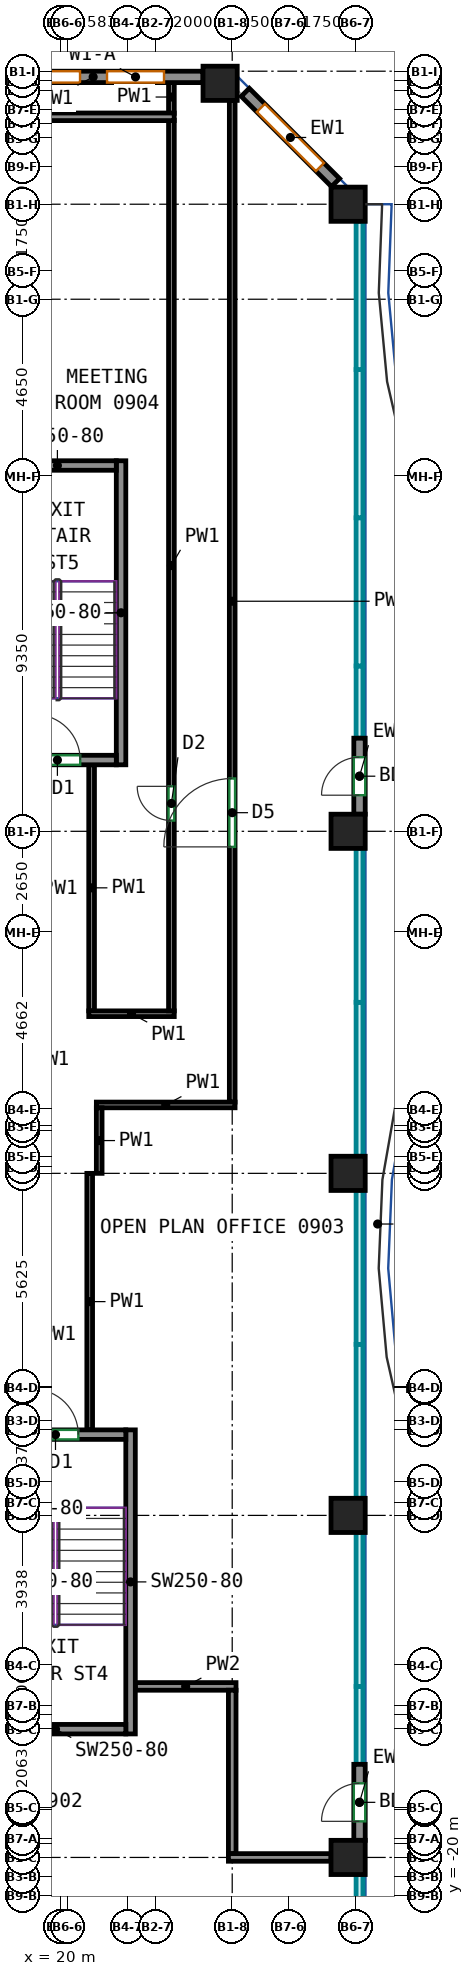
"""IFC4 building model, lengths in metres.
Left out: names, types, materials, properties, quantities, classifications, styles, units other than length and angle.
Written with IfcOpenShell. Run it as: python <this file> out.ifc"""

import sys

from ifc_helpers import new_model, si_unit, direction, frame, frame_2d, origin, origin_2d, place, context, subcontext, project, spatial, rectangle, extrude, source, transform, mapped, element, fill, save


model = new_model("IFC4")
c1 = context("Model", 3, precision=1e-05, world=origin(), true_north=direction((0.0, 1.0)))
c2 = subcontext(c1, "Body", "Model", "MODEL_VIEW")
j1 = project(units=[si_unit("LENGTHUNIT", "METRE"), si_unit("PLANEANGLEUNIT", "RADIAN")], contexts=[c1])
p1 = place(None, origin())
s1 = spatial("IfcSite", under=j1, at=p1, CompositionType="ELEMENT")
p2 = place(p1, origin())
s2 = spatial("IfcBuilding", under=s1, at=p2, CompositionType="ELEMENT")
p3 = place(p2, frame((0.0, 0.0, 43.0)))
s3 = spatial("IfcBuildingStorey", under=s2, at=p3, CompositionType="ELEMENT", Elevation=43.0)
m1 = source(origin(), c2, "Body", "SweptSolid", [
    extrude(rectangle(XDim=0.9, YDim=0.9, at=origin_2d()), origin(), (0.0, 0.0, 1.0), 3.72),
])
for number, where, z_axis, x_axis in (
    (1, (24.182, 27.682, 0.0), (0.0, 0.0, 1.0), (1.0, 0.0, 0.0)),
    (2, (27.55, -19.0, 0.0), (0.0, 0.0, 1.0), (1.0, 0.0, 0.0)),
    (3, (27.55, -10.0, 0.0), (0.0, 0.0, 1.0), (1.0, 0.0, 0.0)),
    (4, (27.55, -1.0, 0.0), (0.0, 0.0, 1.0), (1.0, 0.0, 0.0)),
    (5, (27.55, 8.0, 0.0), (0.0, 0.0, 1.0), (1.0, 0.0, 0.0)),
    (6, (27.55, 24.5, 0.0), (0.0, 0.0, 1.0), (1.0, 0.0, 0.0)),
):
    element("IfcColumn", number, at=place(p3, frame(where, z_axis=z_axis, x_axis=x_axis)), inside=s3, PredefinedType="COLUMN", context=c2, shape_type="MappedRepresentation", body=[
        mapped(m1, transform((0.0, 0.0, 0.0))),
    ])
m2 = source(origin(), c2, "Body", "SweptSolid", [
    extrude(rectangle(XDim=8.0, YDim=0.25, at=frame_2d((4.0, 0.0))), origin(), (0.0, 0.0, 1.0), 3.72),
])
p4 = place(p3, frame((21.825, -15.75, 0.0), z_axis=(0.0, 0.0, 1.0), x_axis=(0.0, 1.0, 0.0)))
e7 = element("IfcWall", 7, at=p4, inside=s3, PredefinedType="SHEAR", context=c2, shape_type="MappedRepresentation", body=[
    mapped(m2, transform((0.0, 0.0, 0.0))),
])
m3 = source(origin(), c2, "Body", "SweptSolid", [
    extrude(rectangle(XDim=3.7, YDim=0.25, at=frame_2d((1.85, 0.0))), origin(), (0.0, 0.0, 1.0), 3.72),
])
p5 = place(p3, frame((18.0, -15.625, 0.0), z_axis=(0.0, 0.0, 1.0), x_axis=(1.0, 0.0, 0.0)))
e8 = element("IfcWall", 8, at=p5, inside=s3, PredefinedType="SHEAR", context=c2, shape_type="MappedRepresentation", body=[
    mapped(m3, transform((0.0, 0.0, 0.0))),
])
p6 = place(p3, frame((18.0, -7.875, 0.0), z_axis=(0.0, 0.0, 1.0), x_axis=(1.0, 0.0, 0.0)))
e9 = element("IfcWall", 9, at=p6, inside=s3, PredefinedType="SHEAR", context=c2, shape_type="MappedRepresentation", body=[
    mapped(m3, transform((0.0, 0.0, 0.0))),
])
p7 = place(p6, frame((1.25, 0.0, 0.0)))
e10 = element("IfcOpeningElement", 10, at=p7, cuts=e9, PredefinedType="OPENING", context=c2, shape_type="SweptSolid", body=[
    extrude(rectangle(XDim=1.2, YDim=2.1, at=frame_2d((0.6, 1.05))), frame((0.0, 0.135, 0.0), z_axis=(0.0, -1.0, 0.0), x_axis=(1.0, 0.0, 0.0)), (0.0, 0.0, 1.0), 0.27),
])
p8 = place(p3, frame((21.575, 9.75, 0.0), z_axis=(0.0, 0.0, 1.0), x_axis=(0.0, 1.0, 0.0)))
e11 = element("IfcWall", 11, at=p8, inside=s3, PredefinedType="SHEAR", context=c2, shape_type="MappedRepresentation", body=[
    mapped(m2, transform((0.0, 0.0, 0.0))),
])
m4 = source(origin(), c2, "Body", "SweptSolid", [
    extrude(rectangle(XDim=3.1, YDim=0.25, at=frame_2d((1.55, 0.0))), origin(), (0.0, 0.0, 1.0), 3.72),
])
p9 = place(p3, frame((18.35, 9.875, 0.0), z_axis=(0.0, 0.0, 1.0), x_axis=(1.0, 0.0, 0.0)))
e12 = element("IfcWall", 12, at=p9, inside=s3, PredefinedType="SHEAR", context=c2, shape_type="MappedRepresentation", body=[
    mapped(m4, transform((0.0, 0.0, 0.0))),
])
p10 = place(p9, frame((0.95, 0.0, 0.0)))
e13 = element("IfcOpeningElement", 13, at=p10, cuts=e12, PredefinedType="OPENING", context=c2, shape_type="SweptSolid", body=[
    extrude(rectangle(XDim=1.2, YDim=2.1, at=frame_2d((0.6, 1.05))), frame((0.0, 0.135, 0.0), z_axis=(0.0, -1.0, 0.0), x_axis=(1.0, 0.0, 0.0)), (0.0, 0.0, 1.0), 0.27),
])
p11 = place(p3, frame((18.35, 17.625, 0.0), z_axis=(0.0, 0.0, 1.0), x_axis=(1.0, 0.0, 0.0)))
e14 = element("IfcWall", 14, at=p11, inside=s3, PredefinedType="SHEAR", context=c2, shape_type="MappedRepresentation", body=[
    mapped(m4, transform((0.0, 0.0, 0.0))),
])
m5 = source(origin(), c2, "Body", "SweptSolid", [
    extrude(rectangle(XDim=2.0, YDim=0.3, at=frame_2d((1.0, 0.0))), origin(), (0.0, 0.0, 1.0), 3.72),
])
p12 = place(p3, frame((27.85, -18.55, 0.0), z_axis=(0.0, 0.0, 1.0), x_axis=(0.0, 1.0, 0.0)))
e15 = element("IfcWall", 15, at=p12, inside=s3, PredefinedType="SOLIDWALL", context=c2, shape_type="MappedRepresentation", body=[
    mapped(m5, transform((0.0, 0.0, 0.0))),
])
p13 = place(p12, frame((0.5, 0.0, 0.0)))
e16 = element("IfcOpeningElement", 16, at=p13, cuts=e15, PredefinedType="OPENING", context=c2, shape_type="SweptSolid", body=[
    extrude(rectangle(XDim=1.0, YDim=2.1, at=frame_2d((0.5, 1.05))), frame((0.0, 0.16, 0.0), z_axis=(0.0, -1.0, 0.0), x_axis=(1.0, 0.0, 0.0)), (0.0, 0.0, 1.0), 0.32),
])
p14 = place(p3, frame((27.85, 8.45, 0.0), z_axis=(0.0, 0.0, 1.0), x_axis=(0.0, 1.0, 0.0)))
e17 = element("IfcWall", 17, at=p14, inside=s3, PredefinedType="SOLIDWALL", context=c2, shape_type="MappedRepresentation", body=[
    mapped(m5, transform((0.0, 0.0, 0.0))),
])
p15 = place(p14, frame((0.5, 0.0, 0.0)))
e18 = element("IfcOpeningElement", 18, at=p15, cuts=e17, PredefinedType="OPENING", context=c2, shape_type="SweptSolid", body=[
    extrude(rectangle(XDim=1.0, YDim=2.1, at=frame_2d((0.5, 1.05))), frame((0.0, 0.16, 0.0), z_axis=(0.0, -1.0, 0.0), x_axis=(1.0, 0.0, 0.0)), (0.0, 0.0, 1.0), 0.32),
])
m6 = source(origin(), c2, "Body", "SweptSolid", [
    extrude(rectangle(XDim=3.359, YDim=0.3, at=frame_2d((1.679, 0.0))), origin(), (0.0, 0.0, 1.0), 3.72),
])
p16 = place(p3, frame((27.219, 25.069, 0.0), z_axis=(0.0, 0.0, 1.0), x_axis=(-0.707070438228, 0.707143122278, 0.0)))
e19 = element("IfcWall", 19, at=p16, inside=s3, PredefinedType="SOLIDWALL", context=c2, shape_type="MappedRepresentation", body=[
    mapped(m6, transform((0.0, 0.0, 0.0))),
])
p17 = place(p16, frame((0.579, 0.0, 0.7)))
e20 = element("IfcOpeningElement", 20, at=p17, cuts=e19, PredefinedType="OPENING", context=c2, shape_type="SweptSolid", body=[
    extrude(rectangle(XDim=2.2, YDim=2.25, at=frame_2d((1.1, 1.125))), frame((0.0, 0.16, 0.0), z_axis=(0.0, -1.0, 0.0), x_axis=(1.0, 0.0, 0.0)), (0.0, 0.0, 1.0), 0.32),
])
m7 = source(origin(), c2, "Body", "SweptSolid", [
    extrude(rectangle(XDim=5.782, YDim=0.3, at=frame_2d((2.891, 0.0))), origin(), (0.0, 0.0, 1.0), 3.72),
])
p18 = place(p3, frame((23.732, 27.85, 0.0), z_axis=(0.0, 0.0, 1.0), x_axis=(-1.0, 0.0, 0.0)))
e21 = element("IfcWall", 21, at=p18, inside=s3, PredefinedType="SOLIDWALL", context=c2, shape_type="MappedRepresentation", body=[
    mapped(m7, transform((0.0, 0.0, 0.0))),
])
p19 = place(p18, frame((1.026, 0.0, 0.7)))
e22 = element("IfcOpeningElement", 22, at=p19, cuts=e21, PredefinedType="OPENING", context=c2, shape_type="SweptSolid", body=[
    extrude(rectangle(XDim=1.5, YDim=2.25, at=frame_2d((0.75, 1.125))), frame((0.0, 0.16, 0.0), z_axis=(0.0, -1.0, 0.0), x_axis=(1.0, 0.0, 0.0)), (0.0, 0.0, 1.0), 0.32),
])
p20 = place(p18, frame((3.236, 0.0, 0.7)))
e23 = element("IfcOpeningElement", 23, at=p20, cuts=e21, PredefinedType="OPENING", context=c2, shape_type="SweptSolid", body=[
    extrude(rectangle(XDim=2.2, YDim=2.25, at=frame_2d((1.1, 1.125))), frame((0.0, 0.16, 0.0), z_axis=(0.0, -1.0, 0.0), x_axis=(1.0, 0.0, 0.0)), (0.0, 0.0, 1.0), 0.32),
])
p21 = place(p3, frame((20.8, 3.275, 0.0), z_axis=(0.0, 0.0, 1.0), x_axis=(0.0, 1.0, 0.0)))
e24 = element("IfcWall", 24, at=p21, inside=s3, PredefinedType="PARTITIONING", context=c2, shape_type="SweptSolid", body=[
    extrude(rectangle(XDim=6.475, YDim=0.15, at=frame_2d((3.238, 0.0))), origin(), (0.0, 0.0, 1.0), 3.72),
])
p22 = place(p3, frame((20.725, 3.2, 0.0), z_axis=(0.0, 0.0, 1.0), x_axis=(1.0, 0.0, 0.0)))
e25 = element("IfcWall", 25, at=p22, inside=s3, PredefinedType="PARTITIONING", context=c2, shape_type="SweptSolid", body=[
    extrude(rectangle(XDim=2.25, YDim=0.15, at=frame_2d((1.125, 0.0))), origin(), (0.0, 0.0, 1.0), 3.72),
])
p23 = place(p3, frame((22.9, 3.275, 0.0), z_axis=(0.0, 0.0, 1.0), x_axis=(0.0, 1.0, 0.0)))
e26 = element("IfcWall", 26, at=p23, inside=s3, PredefinedType="PARTITIONING", context=c2, shape_type="SweptSolid", body=[
    extrude(rectangle(XDim=23.435, YDim=0.15, at=frame_2d((11.718, 0.0))), origin(), (0.0, 0.0, 1.0), 3.72),
])
p24 = place(p23, frame((5.008, 0.0, 0.0)))
e27 = element("IfcOpeningElement", 27, at=p24, cuts=e26, PredefinedType="OPENING", context=c2, shape_type="SweptSolid", body=[
    extrude(rectangle(XDim=0.9, YDim=2.1, at=frame_2d((0.45, 1.05))), frame((0.0, 0.085, 0.0), z_axis=(0.0, -1.0, 0.0), x_axis=(1.0, 0.0, 0.0)), (0.0, 0.0, 1.0), 0.17),
])
p25 = place(p3, frame((24.5, 0.875, 0.0), z_axis=(0.0, 0.0, 1.0), x_axis=(0.0, 1.0, 0.0)))
e28 = element("IfcWall", 28, at=p25, inside=s3, PredefinedType="PARTITIONING", context=c2, shape_type="SweptSolid", body=[
    extrude(rectangle(XDim=26.357, YDim=0.15, at=frame_2d((13.178, 0.0))), origin(), (0.0, 0.0, 1.0), 3.07),
])
p26 = place(p25, frame((6.715, 0.0, 0.0)))
e29 = element("IfcOpeningElement", 29, at=p26, cuts=e28, PredefinedType="OPENING", context=c2, shape_type="SweptSolid", body=[
    extrude(rectangle(XDim=1.8, YDim=2.1, at=frame_2d((0.9, 1.05))), frame((0.0, 0.085, 0.0), z_axis=(0.0, -1.0, 0.0), x_axis=(1.0, 0.0, 0.0)), (0.0, 0.0, 1.0), 0.17),
])
p27 = place(p3, frame((20.925, 0.8, 0.0), z_axis=(0.0, 0.0, 1.0), x_axis=(1.0, 0.0, 0.0)))
e30 = element("IfcWall", 30, at=p27, inside=s3, PredefinedType="PARTITIONING", context=c2, shape_type="SweptSolid", body=[
    extrude(rectangle(XDim=3.65, YDim=0.15, at=frame_2d((1.825, 0.0))), origin(), (0.0, 0.0, 1.0), 3.72),
])
p28 = place(p3, frame((21.0, -1.0, 0.0), z_axis=(0.0, 0.0, 1.0), x_axis=(0.0, 1.0, 0.0)))
e31 = element("IfcWall", 31, at=p28, inside=s3, PredefinedType="PARTITIONING", context=c2, shape_type="SweptSolid", body=[
    extrude(rectangle(XDim=1.725, YDim=0.15, at=frame_2d((0.863, 0.0))), origin(), (0.0, 0.0, 1.0), 3.72),
])
p29 = place(p3, frame((20.75, -7.75, 0.0), z_axis=(0.0, 0.0, 1.0), x_axis=(0.0, 1.0, 0.0)))
e32 = element("IfcWall", 32, at=p29, inside=s3, PredefinedType="PARTITIONING", context=c2, shape_type="SweptSolid", body=[
    extrude(rectangle(XDim=6.75, YDim=0.15, at=frame_2d((3.375, 0.0))), origin(), (0.0, 0.0, 1.0), 3.72),
])
p30 = place(p3, frame((22.9, 26.891, 0.0), z_axis=(0.0, 0.0, 1.0), x_axis=(0.0, 1.0, 0.0)))
e33 = element("IfcWall", 33, at=p30, inside=s3, PredefinedType="PARTITIONING", context=c2, shape_type="SweptSolid", body=[
    extrude(rectangle(XDim=0.859, YDim=0.15, at=frame_2d((0.429, 0.0))), origin(), (0.0, 0.0, 1.0), 3.72),
])
p31 = place(p3, frame((-20.874, 26.8, 0.0), z_axis=(0.0, 0.0, 1.0), x_axis=(1.0, 0.0, 0.0)))
e34 = element("IfcWall", 34, at=p31, inside=s3, PredefinedType="PARTITIONING", context=c2, shape_type="SweptSolid", body=[
    extrude(rectangle(XDim=43.848, YDim=0.2, at=frame_2d((21.924, 0.0))), origin(), (0.0, 0.0, 1.0), 3.72),
])
p32 = place(p31, frame((31.863, 0.0, 0.0)))
e35 = element("IfcOpeningElement", 35, at=p32, cuts=e34, PredefinedType="OPENING", context=c2, shape_type="SweptSolid", body=[
    extrude(rectangle(XDim=1.0, YDim=2.1, at=frame_2d((0.5, 1.05))), frame((0.0, 0.11, 0.0), z_axis=(0.0, -1.0, 0.0), x_axis=(1.0, 0.0, 0.0)), (0.0, 0.0, 1.0), 0.22),
])
p33 = place(p3, frame((24.6, -14.5, 0.0), z_axis=(0.0, 0.0, 1.0), x_axis=(-1.0, 0.0, 0.0)))
e36 = element("IfcWall", 36, at=p33, inside=s3, PredefinedType="PARTITIONING", context=c2, shape_type="SweptSolid", body=[
    extrude(rectangle(XDim=2.65, YDim=0.2, at=frame_2d((1.325, 0.0))), origin(), (0.0, 0.0, 1.0), 3.72),
])
p34 = place(p3, frame((24.5, -18.9, 0.0), z_axis=(0.0, 0.0, 1.0), x_axis=(0.0, 1.0, 0.0)))
e37 = element("IfcWall", 37, at=p34, inside=s3, PredefinedType="PARTITIONING", context=c2, shape_type="SweptSolid", body=[
    extrude(rectangle(XDim=4.3, YDim=0.2, at=frame_2d((2.15, 0.0))), origin(), (0.0, 0.0, 1.0), 3.07),
])
p35 = place(p3, frame((27.1, -19.0, 0.0), z_axis=(0.0, 0.0, 1.0), x_axis=(-1.0, 0.0, 0.0)))
e38 = element("IfcWall", 38, at=p35, inside=s3, PredefinedType="PARTITIONING", context=c2, shape_type="SweptSolid", body=[
    extrude(rectangle(XDim=2.7, YDim=0.2, at=frame_2d((1.35, 0.0))), origin(), (0.0, 0.0, 1.0), 3.07),
])
p36 = place(p13, origin())
e39 = element("IfcDoor", 39, at=p36, inside=s3, OperationType="SINGLE_SWING_LEFT", PredefinedType="DOOR", context=c2, shape_type="SweptSolid", body=[
    extrude(rectangle(XDim=1.0, YDim=2.1, at=frame_2d((0.5, 1.05))), frame((0.0, 0.025, 0.0), z_axis=(0.0, -1.0, 0.0), x_axis=(1.0, 0.0, 0.0)), (0.0, 0.0, 1.0), 0.05),
])
fill(e16, e39)
p37 = place(p15, origin())
e40 = element("IfcDoor", 40, at=p37, inside=s3, OperationType="SINGLE_SWING_LEFT", PredefinedType="DOOR", context=c2, shape_type="SweptSolid", body=[
    extrude(rectangle(XDim=1.0, YDim=2.1, at=frame_2d((0.5, 1.05))), frame((0.0, 0.025, 0.0), z_axis=(0.0, -1.0, 0.0), x_axis=(1.0, 0.0, 0.0)), (0.0, 0.0, 1.0), 0.05),
])
fill(e18, e40)
p38 = place(p17, origin())
e41 = element("IfcWindow", 41, at=p38, inside=s3, PartitioningType="SINGLE_PANEL", PredefinedType="WINDOW", context=c2, shape_type="SweptSolid", body=[
    extrude(rectangle(XDim=2.2, YDim=2.25, at=frame_2d((1.1, 1.125))), frame((0.0, 0.03, 0.0), z_axis=(0.0, -1.0, 0.0), x_axis=(1.0, 0.0, 0.0)), (0.0, 0.0, 1.0), 0.06),
])
fill(e20, e41)
p39 = place(p19, origin())
e42 = element("IfcWindow", 42, at=p39, inside=s3, PartitioningType="SINGLE_PANEL", PredefinedType="WINDOW", context=c2, shape_type="SweptSolid", body=[
    extrude(rectangle(XDim=1.5, YDim=2.25, at=frame_2d((0.75, 1.125))), frame((0.0, 0.03, 0.0), z_axis=(0.0, -1.0, 0.0), x_axis=(1.0, 0.0, 0.0)), (0.0, 0.0, 1.0), 0.06),
])
fill(e22, e42)
p40 = place(p20, origin())
e43 = element("IfcWindow", 43, at=p40, inside=s3, PartitioningType="SINGLE_PANEL", PredefinedType="WINDOW", context=c2, shape_type="SweptSolid", body=[
    extrude(rectangle(XDim=2.2, YDim=2.25, at=frame_2d((1.1, 1.125))), frame((0.0, 0.03, 0.0), z_axis=(0.0, -1.0, 0.0), x_axis=(1.0, 0.0, 0.0)), (0.0, 0.0, 1.0), 0.06),
])
fill(e23, e43)
p41 = place(p7, origin())
e44 = element("IfcDoor", 44, at=p41, inside=s3, OperationType="DOUBLE_DOOR_SINGLE_SWING", PredefinedType="DOOR", context=c2, shape_type="SweptSolid", body=[
    extrude(rectangle(XDim=1.2, YDim=2.1, at=frame_2d((0.6, 1.05))), frame((0.0, 0.025, 0.0), z_axis=(0.0, -1.0, 0.0), x_axis=(1.0, 0.0, 0.0)), (0.0, 0.0, 1.0), 0.05),
])
fill(e10, e44)
p42 = place(p10, origin())
e45 = element("IfcDoor", 45, at=p42, inside=s3, OperationType="DOUBLE_DOOR_SINGLE_SWING", PredefinedType="DOOR", context=c2, shape_type="SweptSolid", body=[
    extrude(rectangle(XDim=1.2, YDim=2.1, at=frame_2d((0.6, 1.05))), frame((0.0, 0.025, 0.0), z_axis=(0.0, -1.0, 0.0), x_axis=(1.0, 0.0, 0.0)), (0.0, 0.0, 1.0), 0.05),
])
fill(e13, e45)
p43 = place(p26, origin())
e46 = element("IfcDoor", 46, at=p43, inside=s3, OperationType="DOUBLE_DOOR_SINGLE_SWING", PredefinedType="DOOR", context=c2, shape_type="SweptSolid", body=[
    extrude(rectangle(XDim=1.8, YDim=2.1, at=frame_2d((0.9, 1.05))), frame((0.0, 0.025, 0.0), z_axis=(0.0, -1.0, 0.0), x_axis=(1.0, 0.0, 0.0)), (0.0, 0.0, 1.0), 0.05),
])
fill(e29, e46)
p44 = place(p24, origin())
e47 = element("IfcDoor", 47, at=p44, inside=s3, OperationType="SINGLE_SWING_RIGHT", PredefinedType="DOOR", context=c2, shape_type="SweptSolid", body=[
    extrude(rectangle(XDim=0.9, YDim=2.1, at=frame_2d((0.45, 1.05))), frame((0.0, 0.025, 0.0), z_axis=(0.0, -1.0, 0.0), x_axis=(1.0, 0.0, 0.0)), (0.0, 0.0, 1.0), 0.05),
])
fill(e27, e47)
save(model, sys.argv[1])
